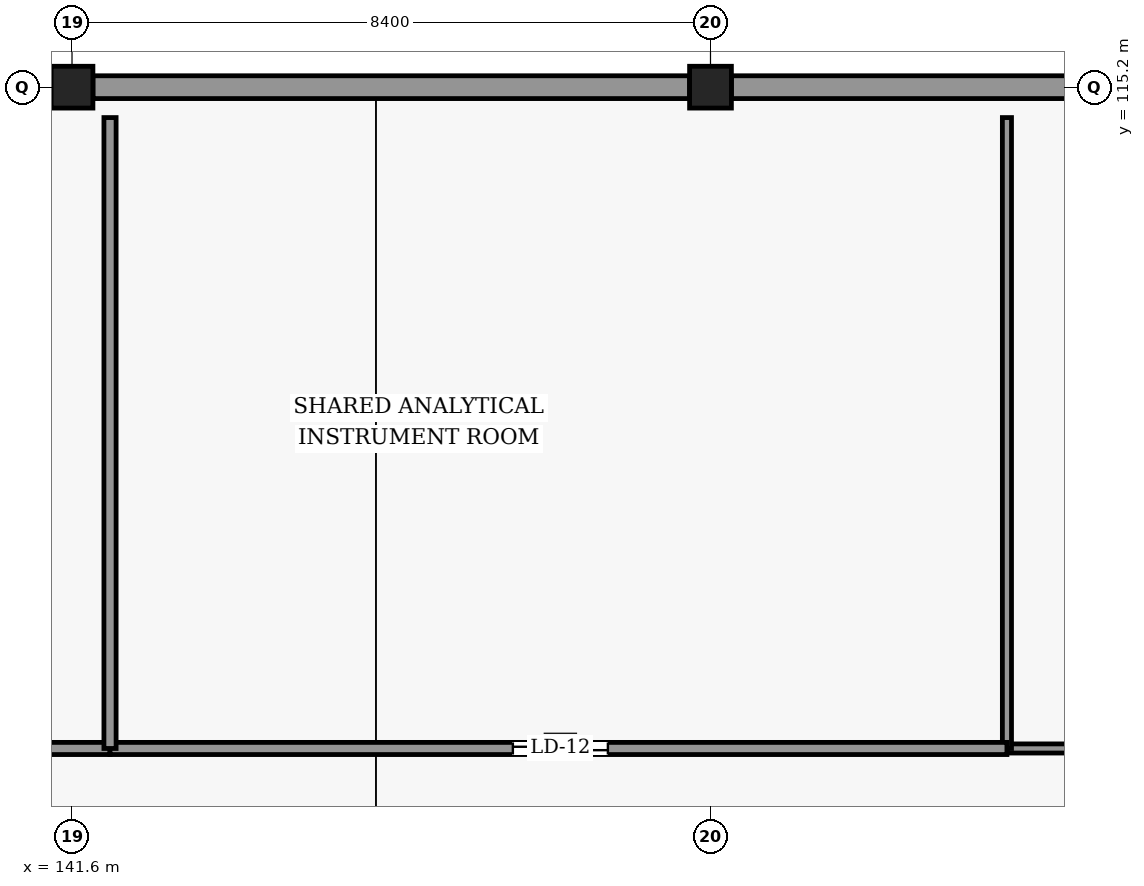
"""IFC4 building model, lengths in metres.
Left out: names, types, materials, properties, quantities, classifications, styles, units other than length and angle.
Written with IfcOpenShell. Run it as: python <this file> out.ifc"""

import sys

from ifc_helpers import new_model, si_unit, direction, frame, frame_2d, origin, origin_2d, place, context, subcontext, project, spatial, rectangle, hollow_rectangle, extrude, element, fill, save


model = new_model("IFC4")
c1 = context("Model", 3, precision=1e-05, world=origin(), true_north=direction((0.0, 1.0)))
c2 = subcontext(c1, "Body", "Model", "MODEL_VIEW")
j1 = project(units=[si_unit("LENGTHUNIT", "METRE"), si_unit("PLANEANGLEUNIT", "RADIAN")], contexts=[c1])
p1 = place(None, origin())
s1 = spatial("IfcSite", under=j1, at=p1, CompositionType="ELEMENT")
p2 = place(p1, origin())
s2 = spatial("IfcBuilding", under=s1, at=p2, CompositionType="ELEMENT")
p3 = place(p2, frame((0.0, 0.0, 24.6)))
s3 = spatial("IfcBuildingStorey", under=s2, at=p3, CompositionType="ELEMENT", Elevation=24.6)
for number, where, z_axis, x_axis in (
    (1, (141.6, 115.2, 0.0), (0.0, 0.0, 1.0), (1.0, 0.0, 0.0)),
    (2, (150.0, 115.2, 0.0), (0.0, 0.0, 1.0), (1.0, 0.0, 0.0)),
):
    element("IfcColumn", number, at=place(p3, frame(where, z_axis=z_axis, x_axis=x_axis)), inside=s3, PredefinedType="COLUMN", context=c2, shape_type="SweptSolid", body=[
        extrude(hollow_rectangle(XDim=0.55, YDim=0.55, WallThickness=0.022, InnerFilletRadius=0.022, OuterFilletRadius=0.044, at=origin_2d()), origin(), (0.0, 0.0, 1.0), 3.6),
    ])
p4 = place(p3, frame((158.725, 115.2, 0.0), z_axis=(0.0, 0.0, 1.0), x_axis=(-1.0, 0.0, 0.0)))
e3 = element("IfcWall", 3, at=p4, inside=s3, PredefinedType="SOLIDWALL", context=c2, shape_type="SweptSolid", body=[
    extrude(rectangle(XDim=8.45, YDim=0.3, at=frame_2d((4.225, 0.0))), origin(), (0.0, 0.0, 1.0), 2.553),
])
p5 = place(p3, frame((149.725, 115.2, 0.0), z_axis=(0.0, 0.0, 1.0), x_axis=(-1.0, 0.0, 0.0)))
e4 = element("IfcWall", 4, at=p5, inside=s3, PredefinedType="SOLIDWALL", context=c2, shape_type="SweptSolid", body=[
    extrude(rectangle(XDim=7.85, YDim=0.3, at=frame_2d((3.925, 0.0))), origin(), (0.0, 0.0, 1.0), 2.845),
])
p6 = place(p3, frame((153.9, 106.5, 0.0), z_axis=(0.0, 0.0, 1.0), x_axis=(1.0, 0.0, 0.0)))
e5 = element("IfcWall", 5, at=p6, inside=s3, PredefinedType="PARTITIONING", context=c2, shape_type="SweptSolid", body=[
    extrude(rectangle(XDim=3.6, YDim=0.12, at=frame_2d((1.8, 0.0))), origin(), (0.0, 0.0, 1.0), 3.345),
])
p7 = place(p6, frame((1.35, 0.0, 0.0)))
e6 = element("IfcOpeningElement", 6, at=p7, cuts=e5, PredefinedType="OPENING", context=c2, shape_type="SweptSolid", body=[
    extrude(rectangle(XDim=0.9, YDim=2.1, at=frame_2d((0.45, 1.05))), frame((0.0, 0.07, 0.0), z_axis=(0.0, -1.0, 0.0), x_axis=(1.0, 0.0, 0.0)), (0.0, 0.0, 1.0), 0.14),
])
p8 = place(p3, frame((153.9, 106.5, 0.0), z_axis=(0.0, 0.0, 1.0), x_axis=(0.0, 1.0, 0.0)))
e7 = element("IfcWall", 7, at=p8, inside=s3, PredefinedType="PARTITIONING", context=c2, shape_type="SweptSolid", body=[
    extrude(rectangle(XDim=8.3, YDim=0.12, at=frame_2d((4.15, 0.0))), origin(), (0.0, 0.0, 1.0), 2.945),
])
p9 = place(p3, frame((125.0, 106.5, 0.0), z_axis=(0.0, 0.0, 1.0), x_axis=(1.0, 0.0, 0.0)))
e8 = element("IfcWall", 8, at=p9, inside=s3, PredefinedType="PARTITIONING", context=c2, shape_type="SweptSolid", body=[
    extrude(rectangle(XDim=17.1, YDim=0.16, at=frame_2d((8.55, 0.0))), origin(), (0.0, 0.0, 1.0), 2.595),
])
p10 = place(p9, frame((8.0, 0.0, 0.0)))
e9 = element("IfcOpeningElement", 9, at=p10, cuts=e8, PredefinedType="OPENING", context=c2, shape_type="SweptSolid", body=[
    extrude(rectangle(XDim=1.08, YDim=2.08, at=frame_2d((0.54, 1.04))), frame((0.0, 0.09, 0.0), z_axis=(0.0, -1.0, 0.0), x_axis=(1.0, 0.0, 0.0)), (0.0, 0.0, 1.0), 0.18),
])
p11 = place(p3, frame((142.1, 106.5, 0.0), z_axis=(0.0, 0.0, 1.0), x_axis=(1.0, 0.0, 0.0)))
e10 = element("IfcWall", 10, at=p11, inside=s3, PredefinedType="PARTITIONING", context=c2, shape_type="SweptSolid", body=[
    extrude(rectangle(XDim=11.8, YDim=0.16, at=frame_2d((5.9, 0.0))), origin(), (0.0, 0.0, 1.0), 2.595),
])
p12 = place(p11, frame((5.3, 0.0, 0.0)))
e11 = element("IfcOpeningElement", 11, at=p12, cuts=e10, PredefinedType="OPENING", context=c2, shape_type="SweptSolid", body=[
    extrude(rectangle(XDim=1.25, YDim=2.12, at=frame_2d((0.625, 1.06))), frame((0.0, 0.09, 0.0), z_axis=(0.0, -1.0, 0.0), x_axis=(1.0, 0.0, 0.0)), (0.0, 0.0, 1.0), 0.18),
])
p13 = place(p3, frame((142.1, 106.5, 0.0), z_axis=(0.0, 0.0, 1.0), x_axis=(0.0, 1.0, 0.0)))
e12 = element("IfcWall", 12, at=p13, inside=s3, PredefinedType="PARTITIONING", context=c2, shape_type="SweptSolid", body=[
    extrude(rectangle(XDim=8.3, YDim=0.16, at=frame_2d((4.15, 0.0))), origin(), (0.0, 0.0, 1.0), 2.995),
])
p14 = place(p12, origin())
e13 = element("IfcDoor", 13, at=p14, inside=s3, OperationType="SINGLE_SWING_LEFT", PredefinedType="DOOR", context=c2, shape_type="SweptSolid", body=[
    extrude(rectangle(XDim=1.25, YDim=2.12, at=frame_2d((0.625, 1.06))), frame((0.0, 0.025, 0.0), z_axis=(0.0, -1.0, 0.0), x_axis=(1.0, 0.0, 0.0)), (0.0, 0.0, 1.0), 0.05),
])
fill(e11, e13)
save(model, sys.argv[1])
